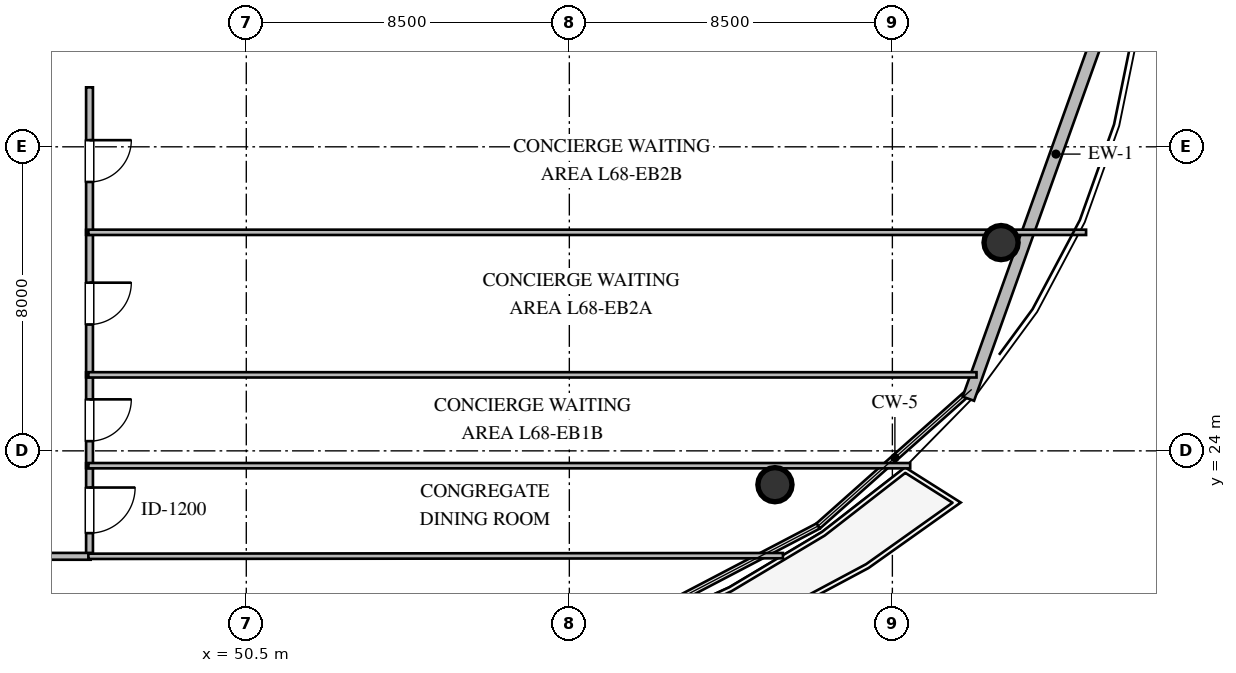
"""IFC4 building model, lengths in metres.
Left out: names, types, materials, properties, quantities, classifications, styles, units other than length and angle.
Written with IfcOpenShell. Run it as: python <this file> out.ifc"""

import sys

from ifc_helpers import new_model, si_unit, direction, frame, frame_2d, origin, origin_2d, place, context, subcontext, project, spatial, rectangle, circle, extrude, element, fill, save


model = new_model("IFC4")
c1 = context("Model", 3, precision=1e-05, world=origin(), true_north=direction((0.0, 1.0)))
c2 = subcontext(c1, "Body", "Model", "MODEL_VIEW")
j1 = project(units=[si_unit("LENGTHUNIT", "METRE"), si_unit("PLANEANGLEUNIT", "RADIAN")], contexts=[c1])
p1 = place(None, origin())
s1 = spatial("IfcSite", under=j1, at=p1, CompositionType="ELEMENT")
p2 = place(p1, origin())
s2 = spatial("IfcBuilding", under=s1, at=p2, CompositionType="ELEMENT")
p3 = place(p2, frame((0.0, 0.0, 258.6)))
s3 = spatial("IfcBuildingStorey", under=s2, at=p3, CompositionType="ELEMENT", Elevation=258.6)
for number, where, z_axis, x_axis in (
    (1, (64.41, 23.11, -0.24), (0.0, 0.0, 1.0), (1.0, 0.0, 0.0)),
    (2, (70.36, 29.48, -0.24), (0.0, 0.0, 1.0), (1.0, 0.0, 0.0)),
):
    element("IfcColumn", number, at=place(p3, frame(where, z_axis=z_axis, x_axis=x_axis)), inside=s3, PredefinedType="COLUMN", context=c2, shape_type="SweptSolid", body=[
        extrude(circle(Radius=0.45, at=origin_2d()), origin(), (0.0, 0.0, 1.0), 4.04),
    ])
p4 = place(p3, frame((74.108, 38.245, 0.0), z_axis=(0.0, 0.0, 1.0), x_axis=(-0.337073777429, -0.941478235845, 0.0)))
e3 = element("IfcWall", 3, at=p4, inside=s3, PredefinedType="STANDARD", context=c2, shape_type="SweptSolid", body=[
    extrude(rectangle(XDim=13.673, YDim=0.32, at=frame_2d((6.837, 0.0))), origin(), (0.0, 0.0, 1.0), 3.56),
])
p5 = place(p3, frame((46.375, 23.675, 0.0), z_axis=(0.0, 0.0, 1.0), x_axis=(0.0, -1.0, 0.0)))
e4 = element("IfcWall", 4, at=p5, inside=s3, PredefinedType="PARTITIONING", context=c2, shape_type="SweptSolid", body=[
    extrude(rectangle(XDim=2.48, YDim=0.18, at=frame_2d((1.24, 0.0))), origin(), (0.0, 0.0, 1.0), 3.56),
])
p6 = place(p5, frame((0.64, 0.0, 0.0)))
e5 = element("IfcOpeningElement", 5, at=p6, cuts=e4, PredefinedType="OPENING", context=c2, shape_type="SweptSolid", body=[
    extrude(rectangle(XDim=1.2, YDim=2.15, at=frame_2d((0.6, 1.075))), frame((0.0, 0.1, 0.0), z_axis=(0.0, -1.0, 0.0), x_axis=(1.0, 0.0, 0.0)), (0.0, 0.0, 1.0), 0.2),
])
p7 = place(p3, frame((46.375, 26.065, 0.0), z_axis=(0.0, 0.0, 1.0), x_axis=(0.0, -1.0, 0.0)))
e6 = element("IfcWall", 6, at=p7, inside=s3, PredefinedType="PARTITIONING", context=c2, shape_type="SweptSolid", body=[
    extrude(rectangle(XDim=2.52, YDim=0.18, at=frame_2d((1.26, 0.0))), origin(), (0.0, 0.0, 1.0), 3.56),
])
p8 = place(p7, frame((0.71, 0.0, 0.0)))
e7 = element("IfcOpeningElement", 7, at=p8, cuts=e6, PredefinedType="OPENING", context=c2, shape_type="SweptSolid", body=[
    extrude(rectangle(XDim=1.1, YDim=2.1, at=frame_2d((0.55, 1.05))), frame((0.0, 0.1, 0.0), z_axis=(0.0, -1.0, 0.0), x_axis=(1.0, 0.0, 0.0)), (0.0, 0.0, 1.0), 0.2),
])
p9 = place(p3, frame((46.375, 29.815, 0.0), z_axis=(0.0, 0.0, 1.0), x_axis=(0.0, -1.0, 0.0)))
e8 = element("IfcWall", 8, at=p9, inside=s3, PredefinedType="PARTITIONING", context=c2, shape_type="SweptSolid", body=[
    extrude(rectangle(XDim=3.88, YDim=0.18, at=frame_2d((1.94, 0.0))), origin(), (0.0, 0.0, 1.0), 3.56),
])
p10 = place(p9, frame((1.39, 0.0, 0.0)))
e9 = element("IfcOpeningElement", 9, at=p10, cuts=e8, PredefinedType="OPENING", context=c2, shape_type="SweptSolid", body=[
    extrude(rectangle(XDim=1.1, YDim=2.1, at=frame_2d((0.55, 1.05))), frame((0.0, 0.1, 0.0), z_axis=(0.0, -1.0, 0.0), x_axis=(1.0, 0.0, 0.0)), (0.0, 0.0, 1.0), 0.2),
])
p11 = place(p3, frame((46.375, 33.565, 0.0), z_axis=(0.0, 0.0, 1.0), x_axis=(0.0, -1.0, 0.0)))
e10 = element("IfcWall", 10, at=p11, inside=s3, PredefinedType="PARTITIONING", context=c2, shape_type="SweptSolid", body=[
    extrude(rectangle(XDim=3.88, YDim=0.18, at=frame_2d((1.94, 0.0))), origin(), (0.0, 0.0, 1.0), 3.56),
])
p12 = place(p11, frame((1.39, 0.0, 0.0)))
e11 = element("IfcOpeningElement", 11, at=p12, cuts=e10, PredefinedType="OPENING", context=c2, shape_type="SweptSolid", body=[
    extrude(rectangle(XDim=1.1, YDim=2.1, at=frame_2d((0.55, 1.05))), frame((0.0, 0.1, 0.0), z_axis=(0.0, -1.0, 0.0), x_axis=(1.0, 0.0, 0.0)), (0.0, 0.0, 1.0), 0.2),
])
p13 = place(p3, frame((46.405, 21.225, 0.0), z_axis=(0.0, 0.0, 1.0), x_axis=(-1.0, 0.0, 0.0)))
e12 = element("IfcWall", 12, at=p13, inside=s3, PredefinedType="PARTITIONING", context=c2, shape_type="SweptSolid", body=[
    extrude(rectangle(XDim=13.97, YDim=0.18, at=frame_2d((6.985, 0.0))), origin(), (0.0, 0.0, 1.0), 3.196),
])
p14 = place(p13, frame((6.385, 0.0, 0.0)))
e13 = element("IfcOpeningElement", 13, at=p14, cuts=e12, PredefinedType="OPENING", context=c2, shape_type="SweptSolid", body=[
    extrude(rectangle(XDim=1.2, YDim=2.15, at=frame_2d((0.6, 1.075))), frame((0.0, 0.1, 0.0), z_axis=(0.0, -1.0, 0.0), x_axis=(1.0, 0.0, 0.0)), (0.0, 0.0, 1.0), 0.2),
])
p15 = place(p3, frame((46.345, 23.61, 0.0), z_axis=(0.0, 0.0, 1.0), x_axis=(1.0, 0.0, 0.0)))
e14 = element("IfcWall", 14, at=p15, inside=s3, PredefinedType="PARTITIONING", context=c2, shape_type="SweptSolid", body=[
    extrude(rectangle(XDim=21.624, YDim=0.14, at=frame_2d((10.812, 0.0))), origin(), (0.0, 0.0, 1.0), 3.006),
])
p16 = place(p3, frame((64.621, 21.243, 0.0), z_axis=(0.0, 0.0, 1.0), x_axis=(-0.999999524525, -0.000975166183, 0.0)))
e15 = element("IfcWall", 15, at=p16, inside=s3, PredefinedType="PARTITIONING", context=c2, shape_type="SweptSolid", body=[
    extrude(rectangle(XDim=18.276, YDim=0.14, at=frame_2d((9.138, 0.0))), origin(), (0.0, 0.0, 1.0), 3.196),
])
p17 = place(p3, frame((46.345, 26.0, 0.0), z_axis=(0.0, 0.0, 1.0), x_axis=(1.0, 0.0, 0.0)))
e16 = element("IfcWall", 16, at=p17, inside=s3, PredefinedType="PARTITIONING", context=c2, shape_type="SweptSolid", body=[
    extrude(rectangle(XDim=23.369, YDim=0.14, at=frame_2d((11.685, 0.0))), origin(), (0.0, 0.0, 1.0), 3.006),
])
p18 = place(p3, frame((46.345, 29.75, 0.0), z_axis=(0.0, 0.0, 1.0), x_axis=(1.0, 0.0, 0.0)))
e17 = element("IfcWall", 17, at=p18, inside=s3, PredefinedType="PARTITIONING", context=c2, shape_type="SweptSolid", body=[
    extrude(rectangle(XDim=26.252, YDim=0.14, at=frame_2d((13.126, 0.0))), origin(), (0.0, 0.0, 1.0), 3.006),
])
p19 = place(p6, origin())
e18 = element("IfcDoor", 18, at=p19, inside=s3, OperationType="SINGLE_SWING_LEFT", PredefinedType="DOOR", context=c2, shape_type="SweptSolid", body=[
    extrude(rectangle(XDim=1.2, YDim=2.15, at=frame_2d((0.6, 1.075))), frame((0.0, 0.025, 0.0), z_axis=(0.0, -1.0, 0.0), x_axis=(1.0, 0.0, 0.0)), (0.0, 0.0, 1.0), 0.05),
])
fill(e5, e18)
p20 = place(p8, origin())
e19 = element("IfcDoor", 19, at=p20, inside=s3, OperationType="SINGLE_SWING_LEFT", PredefinedType="DOOR", context=c2, shape_type="SweptSolid", body=[
    extrude(rectangle(XDim=1.1, YDim=2.1, at=frame_2d((0.55, 1.05))), frame((0.0, 0.025, 0.0), z_axis=(0.0, -1.0, 0.0), x_axis=(1.0, 0.0, 0.0)), (0.0, 0.0, 1.0), 0.05),
])
fill(e7, e19)
p21 = place(p10, origin())
e20 = element("IfcDoor", 20, at=p21, inside=s3, OperationType="SINGLE_SWING_LEFT", PredefinedType="DOOR", context=c2, shape_type="SweptSolid", body=[
    extrude(rectangle(XDim=1.1, YDim=2.1, at=frame_2d((0.55, 1.05))), frame((0.0, 0.025, 0.0), z_axis=(0.0, -1.0, 0.0), x_axis=(1.0, 0.0, 0.0)), (0.0, 0.0, 1.0), 0.05),
])
fill(e9, e20)
p22 = place(p12, origin())
e21 = element("IfcDoor", 21, at=p22, inside=s3, OperationType="SINGLE_SWING_LEFT", PredefinedType="DOOR", context=c2, shape_type="SweptSolid", body=[
    extrude(rectangle(XDim=1.1, YDim=2.1, at=frame_2d((0.55, 1.05))), frame((0.0, 0.025, 0.0), z_axis=(0.0, -1.0, 0.0), x_axis=(1.0, 0.0, 0.0)), (0.0, 0.0, 1.0), 0.05),
])
fill(e11, e21)
save(model, sys.argv[1])
